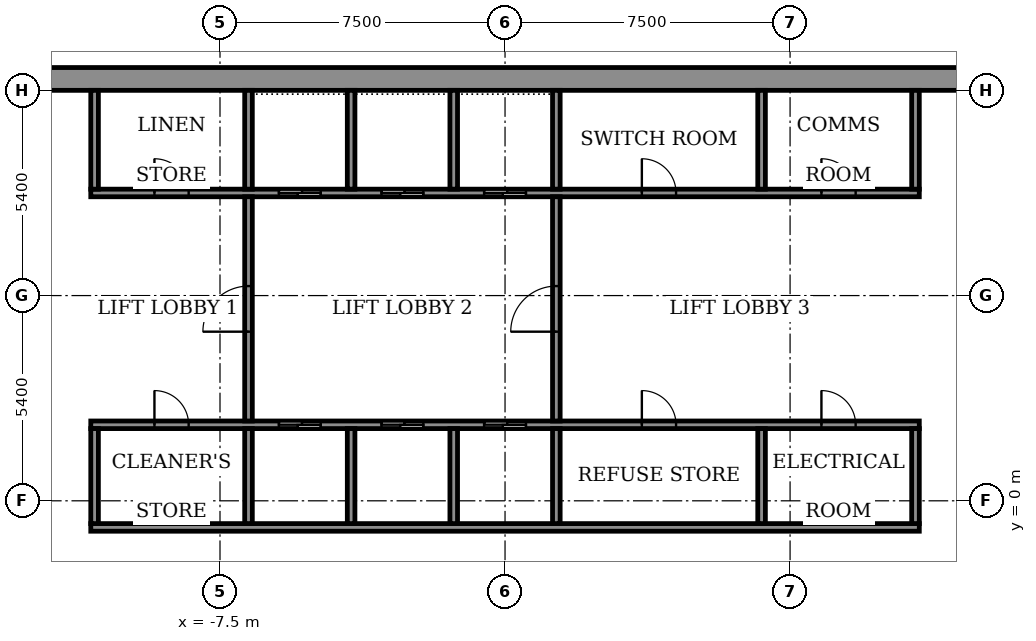
"""IFC4 building model, lengths in metres.
Left out: names, types, materials, properties, quantities, classifications, styles, units other than length and angle.
Written with IfcOpenShell. Run it as: python <this file> out.ifc"""

import sys

from ifc_helpers import new_model, si_unit, direction, frame, frame_2d, origin, place, context, subcontext, project, spatial, rectangle, extrude, element, fill, save


model = new_model("IFC4")
c1 = context("Model", 3, precision=1e-05, world=origin(), true_north=direction((0.0, 1.0)))
c2 = subcontext(c1, "Body", "Model", "MODEL_VIEW")
j1 = project(units=[si_unit("LENGTHUNIT", "METRE"), si_unit("PLANEANGLEUNIT", "RADIAN")], contexts=[c1])
p1 = place(None, origin())
s1 = spatial("IfcSite", under=j1, at=p1, CompositionType="ELEMENT")
p2 = place(p1, origin())
s2 = spatial("IfcBuilding", under=s1, at=p2, CompositionType="ELEMENT")
p3 = place(p2, frame((0.0, 0.0, 309.7)))
s3 = spatial("IfcBuildingStorey", under=s2, at=p3, CompositionType="ELEMENT", Elevation=309.7)
p4 = place(p3, frame((-14.4, 11.1, 0.0), z_axis=(0.0, 0.0, 1.0), x_axis=(1.0, 0.0, 0.0)))
e1 = element("IfcWall", 1, at=p4, inside=s3, PredefinedType="SHEAR", context=c2, shape_type="SweptSolid", body=[
    extrude(rectangle(XDim=28.8, YDim=0.6, at=frame_2d((14.4, 0.0))), origin(), (0.0, 0.0, 1.0), 3.6),
])
p5 = place(p3, frame((-10.9, -0.7, 0.0), z_axis=(0.0, 0.0, 1.0), x_axis=(1.0, 0.0, 0.0)))
e2 = element("IfcWall", 2, at=p5, inside=s3, PredefinedType="SHEAR", context=c2, shape_type="SweptSolid", body=[
    extrude(rectangle(XDim=21.8, YDim=0.2, at=frame_2d((10.9, 0.0))), origin(), (0.0, 0.0, 1.0), 3.05),
])
p6 = place(p3, frame((-10.9, 2.0, 0.0), z_axis=(0.0, 0.0, 1.0), x_axis=(1.0, 0.0, 0.0)))
e3 = element("IfcWall", 3, at=p6, inside=s3, PredefinedType="SHEAR", context=c2, shape_type="SweptSolid", body=[
    extrude(rectangle(XDim=21.8, YDim=0.2, at=frame_2d((10.9, 0.0))), origin(), (0.0, 0.0, 1.0), 3.05),
])
p7 = place(p6, frame((4.95, 0.0, 0.0)))
e4 = element("IfcOpeningElement", 4, at=p7, cuts=e3, PredefinedType="OPENING", context=c2, shape_type="SweptSolid", body=[
    extrude(rectangle(XDim=1.1, YDim=2.1, at=frame_2d((0.55, 1.05))), frame((0.0, 0.11, 0.0), z_axis=(0.0, -1.0, 0.0), x_axis=(1.0, 0.0, 0.0)), (0.0, 0.0, 1.0), 0.22),
])
p8 = place(p6, frame((7.65, 0.0, 0.0)))
e5 = element("IfcOpeningElement", 5, at=p8, cuts=e3, PredefinedType="OPENING", context=c2, shape_type="SweptSolid", body=[
    extrude(rectangle(XDim=1.1, YDim=2.1, at=frame_2d((0.55, 1.05))), frame((0.0, 0.11, 0.0), z_axis=(0.0, -1.0, 0.0), x_axis=(1.0, 0.0, 0.0)), (0.0, 0.0, 1.0), 0.22),
])
p9 = place(p6, frame((10.35, 0.0, 0.0)))
e6 = element("IfcOpeningElement", 6, at=p9, cuts=e3, PredefinedType="OPENING", context=c2, shape_type="SweptSolid", body=[
    extrude(rectangle(XDim=1.1, YDim=2.1, at=frame_2d((0.55, 1.05))), frame((0.0, 0.11, 0.0), z_axis=(0.0, -1.0, 0.0), x_axis=(1.0, 0.0, 0.0)), (0.0, 0.0, 1.0), 0.22),
])
p10 = place(p6, frame((1.675, 0.0, 0.0)))
e7 = element("IfcOpeningElement", 7, at=p10, cuts=e3, PredefinedType="OPENING", context=c2, shape_type="SweptSolid", body=[
    extrude(rectangle(XDim=0.9, YDim=2.1, at=frame_2d((0.45, 1.05))), frame((0.0, 0.11, 0.0), z_axis=(0.0, -1.0, 0.0), x_axis=(1.0, 0.0, 0.0)), (0.0, 0.0, 1.0), 0.22),
])
p11 = place(p6, frame((14.5, 0.0, 0.0)))
e8 = element("IfcOpeningElement", 8, at=p11, cuts=e3, PredefinedType="OPENING", context=c2, shape_type="SweptSolid", body=[
    extrude(rectangle(XDim=0.9, YDim=2.1, at=frame_2d((0.45, 1.05))), frame((0.0, 0.11, 0.0), z_axis=(0.0, -1.0, 0.0), x_axis=(1.0, 0.0, 0.0)), (0.0, 0.0, 1.0), 0.22),
])
p12 = place(p6, frame((19.225, 0.0, 0.0)))
e9 = element("IfcOpeningElement", 9, at=p12, cuts=e3, PredefinedType="OPENING", context=c2, shape_type="SweptSolid", body=[
    extrude(rectangle(XDim=0.9, YDim=2.1, at=frame_2d((0.45, 1.05))), frame((0.0, 0.11, 0.0), z_axis=(0.0, -1.0, 0.0), x_axis=(1.0, 0.0, 0.0)), (0.0, 0.0, 1.0), 0.22),
])
p13 = place(p3, frame((-10.9, 8.1, 0.0), z_axis=(0.0, 0.0, 1.0), x_axis=(1.0, 0.0, 0.0)))
e10 = element("IfcWall", 10, at=p13, inside=s3, PredefinedType="SHEAR", context=c2, shape_type="SweptSolid", body=[
    extrude(rectangle(XDim=21.8, YDim=0.2, at=frame_2d((10.9, 0.0))), origin(), (0.0, 0.0, 1.0), 3.05),
])
p14 = place(p13, frame((4.95, 0.0, 0.0)))
e11 = element("IfcOpeningElement", 11, at=p14, cuts=e10, PredefinedType="OPENING", context=c2, shape_type="SweptSolid", body=[
    extrude(rectangle(XDim=1.1, YDim=2.1, at=frame_2d((0.55, 1.05))), frame((0.0, 0.11, 0.0), z_axis=(0.0, -1.0, 0.0), x_axis=(1.0, 0.0, 0.0)), (0.0, 0.0, 1.0), 0.22),
])
p15 = place(p13, frame((7.65, 0.0, 0.0)))
e12 = element("IfcOpeningElement", 12, at=p15, cuts=e10, PredefinedType="OPENING", context=c2, shape_type="SweptSolid", body=[
    extrude(rectangle(XDim=1.1, YDim=2.1, at=frame_2d((0.55, 1.05))), frame((0.0, 0.11, 0.0), z_axis=(0.0, -1.0, 0.0), x_axis=(1.0, 0.0, 0.0)), (0.0, 0.0, 1.0), 0.22),
])
p16 = place(p13, frame((10.35, 0.0, 0.0)))
e13 = element("IfcOpeningElement", 13, at=p16, cuts=e10, PredefinedType="OPENING", context=c2, shape_type="SweptSolid", body=[
    extrude(rectangle(XDim=1.1, YDim=2.1, at=frame_2d((0.55, 1.05))), frame((0.0, 0.11, 0.0), z_axis=(0.0, -1.0, 0.0), x_axis=(1.0, 0.0, 0.0)), (0.0, 0.0, 1.0), 0.22),
])
p17 = place(p13, frame((1.675, 0.0, 0.0)))
e14 = element("IfcOpeningElement", 14, at=p17, cuts=e10, PredefinedType="OPENING", context=c2, shape_type="SweptSolid", body=[
    extrude(rectangle(XDim=0.9, YDim=2.1, at=frame_2d((0.45, 1.05))), frame((0.0, 0.11, 0.0), z_axis=(0.0, -1.0, 0.0), x_axis=(1.0, 0.0, 0.0)), (0.0, 0.0, 1.0), 0.22),
])
p18 = place(p13, frame((14.5, 0.0, 0.0)))
e15 = element("IfcOpeningElement", 15, at=p18, cuts=e10, PredefinedType="OPENING", context=c2, shape_type="SweptSolid", body=[
    extrude(rectangle(XDim=0.9, YDim=2.1, at=frame_2d((0.45, 1.05))), frame((0.0, 0.11, 0.0), z_axis=(0.0, -1.0, 0.0), x_axis=(1.0, 0.0, 0.0)), (0.0, 0.0, 1.0), 0.22),
])
p19 = place(p13, frame((19.225, 0.0, 0.0)))
e16 = element("IfcOpeningElement", 16, at=p19, cuts=e10, PredefinedType="OPENING", context=c2, shape_type="SweptSolid", body=[
    extrude(rectangle(XDim=0.9, YDim=2.1, at=frame_2d((0.45, 1.05))), frame((0.0, 0.11, 0.0), z_axis=(0.0, -1.0, 0.0), x_axis=(1.0, 0.0, 0.0)), (0.0, 0.0, 1.0), 0.22),
])
p20 = place(p3, frame((-10.8, -0.6, 0.0), z_axis=(0.0, 0.0, 1.0), x_axis=(0.0, 1.0, 0.0)))
e17 = element("IfcWall", 17, at=p20, inside=s3, PredefinedType="STANDARD", context=c2, shape_type="SweptSolid", body=[
    extrude(rectangle(XDim=2.5, YDim=0.2, at=frame_2d((1.25, 0.0))), origin(), (0.0, 0.0, 1.0), 3.05),
])
for number, where, z_axis, x_axis in (
    (18, (-6.75, -0.6, 0.0), (0.0, 0.0, 1.0), (0.0, 1.0, 0.0)),
    (19, (-4.05, -0.6, 0.0), (0.0, 0.0, 1.0), (0.0, 1.0, 0.0)),
    (20, (-1.35, -0.6, 0.0), (0.0, 0.0, 1.0), (0.0, 1.0, 0.0)),
    (21, (1.35, -0.6, 0.0), (0.0, 0.0, 1.0), (0.0, 1.0, 0.0)),
):
    element("IfcWall", number, at=place(p3, frame(where, z_axis=z_axis, x_axis=x_axis)), inside=s3, PredefinedType="SHEAR", context=c2, shape_type="SweptSolid", body=[
        extrude(rectangle(XDim=2.5, YDim=0.2, at=frame_2d((1.25, 0.0))), origin(), (0.0, 0.0, 1.0), 3.05),
    ])
for number, where, z_axis, x_axis in (
    (22, (6.75, -0.6, 0.0), (0.0, 0.0, 1.0), (0.0, 1.0, 0.0)),
    (23, (10.8, -0.6, 0.0), (0.0, 0.0, 1.0), (0.0, 1.0, 0.0)),
):
    element("IfcWall", number, at=place(p3, frame(where, z_axis=z_axis, x_axis=x_axis)), inside=s3, PredefinedType="STANDARD", context=c2, shape_type="SweptSolid", body=[
        extrude(rectangle(XDim=2.5, YDim=0.2, at=frame_2d((1.25, 0.0))), origin(), (0.0, 0.0, 1.0), 3.05),
    ])
p21 = place(p3, frame((-10.8, 8.2, 0.0), z_axis=(0.0, 0.0, 1.0), x_axis=(0.0, 1.0, 0.0)))
e24 = element("IfcWall", 24, at=p21, inside=s3, PredefinedType="STANDARD", context=c2, shape_type="SweptSolid", body=[
    extrude(rectangle(XDim=2.6, YDim=0.2, at=frame_2d((1.3, 0.0))), origin(), (0.0, 0.0, 1.0), 3.05),
])
for number, where, z_axis, x_axis in (
    (25, (-6.75, 8.2, 0.0), (0.0, 0.0, 1.0), (0.0, 1.0, 0.0)),
    (26, (-4.05, 8.2, 0.0), (0.0, 0.0, 1.0), (0.0, 1.0, 0.0)),
    (27, (-1.35, 8.2, 0.0), (0.0, 0.0, 1.0), (0.0, 1.0, 0.0)),
    (28, (1.35, 8.2, 0.0), (0.0, 0.0, 1.0), (0.0, 1.0, 0.0)),
):
    element("IfcWall", number, at=place(p3, frame(where, z_axis=z_axis, x_axis=x_axis)), inside=s3, PredefinedType="SHEAR", context=c2, shape_type="SweptSolid", body=[
        extrude(rectangle(XDim=2.6, YDim=0.2, at=frame_2d((1.3, 0.0))), origin(), (0.0, 0.0, 1.0), 3.05),
    ])
for number, where, z_axis, x_axis in (
    (29, (6.75, 8.2, 0.0), (0.0, 0.0, 1.0), (0.0, 1.0, 0.0)),
    (30, (10.8, 8.2, 0.0), (0.0, 0.0, 1.0), (0.0, 1.0, 0.0)),
):
    element("IfcWall", number, at=place(p3, frame(where, z_axis=z_axis, x_axis=x_axis)), inside=s3, PredefinedType="STANDARD", context=c2, shape_type="SweptSolid", body=[
        extrude(rectangle(XDim=2.6, YDim=0.2, at=frame_2d((1.3, 0.0))), origin(), (0.0, 0.0, 1.0), 3.05),
    ])
p22 = place(p3, frame((-6.75, 2.1, 0.0), z_axis=(0.0, 0.0, 1.0), x_axis=(0.0, 1.0, 0.0)))
e31 = element("IfcWall", 31, at=p22, inside=s3, PredefinedType="STANDARD", context=c2, shape_type="SweptSolid", body=[
    extrude(rectangle(XDim=5.9, YDim=0.2, at=frame_2d((2.95, 0.0))), origin(), (0.0, 0.0, 1.0), 3.05),
])
p23 = place(p22, frame((2.35, 0.0, 0.0)))
e32 = element("IfcOpeningElement", 32, at=p23, cuts=e31, PredefinedType="OPENING", context=c2, shape_type="SweptSolid", body=[
    extrude(rectangle(XDim=1.2, YDim=2.1, at=frame_2d((0.6, 1.05))), frame((0.0, 0.11, 0.0), z_axis=(0.0, -1.0, 0.0), x_axis=(1.0, 0.0, 0.0)), (0.0, 0.0, 1.0), 0.22),
])
p24 = place(p3, frame((1.35, 2.1, 0.0), z_axis=(0.0, 0.0, 1.0), x_axis=(0.0, 1.0, 0.0)))
e33 = element("IfcWall", 33, at=p24, inside=s3, PredefinedType="STANDARD", context=c2, shape_type="SweptSolid", body=[
    extrude(rectangle(XDim=5.9, YDim=0.2, at=frame_2d((2.95, 0.0))), origin(), (0.0, 0.0, 1.0), 3.05),
])
p25 = place(p24, frame((2.35, 0.0, 0.0)))
e34 = element("IfcOpeningElement", 34, at=p25, cuts=e33, PredefinedType="OPENING", context=c2, shape_type="SweptSolid", body=[
    extrude(rectangle(XDim=1.2, YDim=2.1, at=frame_2d((0.6, 1.05))), frame((0.0, 0.11, 0.0), z_axis=(0.0, -1.0, 0.0), x_axis=(1.0, 0.0, 0.0)), (0.0, 0.0, 1.0), 0.22),
])
p26 = place(p7, origin())
e35 = element("IfcDoor", 35, at=p26, inside=s3, OperationType="SLIDING_TO_LEFT", PredefinedType="DOOR", context=c2, shape_type="SweptSolid", body=[
    extrude(rectangle(XDim=1.1, YDim=2.1, at=frame_2d((0.55, 1.05))), frame((0.0, 0.025, 0.0), z_axis=(0.0, -1.0, 0.0), x_axis=(1.0, 0.0, 0.0)), (0.0, 0.0, 1.0), 0.05),
])
fill(e4, e35)
p27 = place(p8, origin())
e36 = element("IfcDoor", 36, at=p27, inside=s3, OperationType="SLIDING_TO_LEFT", PredefinedType="DOOR", context=c2, shape_type="SweptSolid", body=[
    extrude(rectangle(XDim=1.1, YDim=2.1, at=frame_2d((0.55, 1.05))), frame((0.0, 0.025, 0.0), z_axis=(0.0, -1.0, 0.0), x_axis=(1.0, 0.0, 0.0)), (0.0, 0.0, 1.0), 0.05),
])
fill(e5, e36)
p28 = place(p9, origin())
e37 = element("IfcDoor", 37, at=p28, inside=s3, OperationType="SLIDING_TO_LEFT", PredefinedType="DOOR", context=c2, shape_type="SweptSolid", body=[
    extrude(rectangle(XDim=1.1, YDim=2.1, at=frame_2d((0.55, 1.05))), frame((0.0, 0.025, 0.0), z_axis=(0.0, -1.0, 0.0), x_axis=(1.0, 0.0, 0.0)), (0.0, 0.0, 1.0), 0.05),
])
fill(e6, e37)
p29 = place(p14, origin())
e38 = element("IfcDoor", 38, at=p29, inside=s3, OperationType="SLIDING_TO_LEFT", PredefinedType="DOOR", context=c2, shape_type="SweptSolid", body=[
    extrude(rectangle(XDim=1.1, YDim=2.1, at=frame_2d((0.55, 1.05))), frame((0.0, 0.025, 0.0), z_axis=(0.0, -1.0, 0.0), x_axis=(1.0, 0.0, 0.0)), (0.0, 0.0, 1.0), 0.05),
])
fill(e11, e38)
p30 = place(p15, origin())
e39 = element("IfcDoor", 39, at=p30, inside=s3, OperationType="SLIDING_TO_LEFT", PredefinedType="DOOR", context=c2, shape_type="SweptSolid", body=[
    extrude(rectangle(XDim=1.1, YDim=2.1, at=frame_2d((0.55, 1.05))), frame((0.0, 0.025, 0.0), z_axis=(0.0, -1.0, 0.0), x_axis=(1.0, 0.0, 0.0)), (0.0, 0.0, 1.0), 0.05),
])
fill(e12, e39)
p31 = place(p16, origin())
e40 = element("IfcDoor", 40, at=p31, inside=s3, OperationType="SLIDING_TO_LEFT", PredefinedType="DOOR", context=c2, shape_type="SweptSolid", body=[
    extrude(rectangle(XDim=1.1, YDim=2.1, at=frame_2d((0.55, 1.05))), frame((0.0, 0.025, 0.0), z_axis=(0.0, -1.0, 0.0), x_axis=(1.0, 0.0, 0.0)), (0.0, 0.0, 1.0), 0.05),
])
fill(e13, e40)
p32 = place(p10, origin())
e41 = element("IfcDoor", 41, at=p32, inside=s3, OperationType="SINGLE_SWING_RIGHT", PredefinedType="DOOR", context=c2, shape_type="SweptSolid", body=[
    extrude(rectangle(XDim=0.9, YDim=2.1, at=frame_2d((0.45, 1.05))), frame((0.0, 0.025, 0.0), z_axis=(0.0, -1.0, 0.0), x_axis=(1.0, 0.0, 0.0)), (0.0, 0.0, 1.0), 0.05),
])
fill(e7, e41)
p33 = place(p11, origin())
e42 = element("IfcDoor", 42, at=p33, inside=s3, OperationType="SINGLE_SWING_RIGHT", PredefinedType="DOOR", context=c2, shape_type="SweptSolid", body=[
    extrude(rectangle(XDim=0.9, YDim=2.1, at=frame_2d((0.45, 1.05))), frame((0.0, 0.025, 0.0), z_axis=(0.0, -1.0, 0.0), x_axis=(1.0, 0.0, 0.0)), (0.0, 0.0, 1.0), 0.05),
])
fill(e8, e42)
p34 = place(p12, origin())
e43 = element("IfcDoor", 43, at=p34, inside=s3, OperationType="SINGLE_SWING_LEFT", PredefinedType="DOOR", context=c2, shape_type="SweptSolid", body=[
    extrude(rectangle(XDim=0.9, YDim=2.1, at=frame_2d((0.45, 1.05))), frame((0.0, 0.025, 0.0), z_axis=(0.0, -1.0, 0.0), x_axis=(1.0, 0.0, 0.0)), (0.0, 0.0, 1.0), 0.05),
])
fill(e9, e43)
p35 = place(p17, origin())
e44 = element("IfcDoor", 44, at=p35, inside=s3, OperationType="SINGLE_SWING_RIGHT", PredefinedType="DOOR", context=c2, shape_type="SweptSolid", body=[
    extrude(rectangle(XDim=0.9, YDim=2.1, at=frame_2d((0.45, 1.05))), frame((0.0, 0.025, 0.0), z_axis=(0.0, -1.0, 0.0), x_axis=(1.0, 0.0, 0.0)), (0.0, 0.0, 1.0), 0.05),
])
fill(e14, e44)
p36 = place(p18, origin())
e45 = element("IfcDoor", 45, at=p36, inside=s3, OperationType="SINGLE_SWING_LEFT", PredefinedType="DOOR", context=c2, shape_type="SweptSolid", body=[
    extrude(rectangle(XDim=0.9, YDim=2.1, at=frame_2d((0.45, 1.05))), frame((0.0, 0.025, 0.0), z_axis=(0.0, -1.0, 0.0), x_axis=(1.0, 0.0, 0.0)), (0.0, 0.0, 1.0), 0.05),
])
fill(e15, e45)
p37 = place(p19, origin())
e46 = element("IfcDoor", 46, at=p37, inside=s3, OperationType="SINGLE_SWING_LEFT", PredefinedType="DOOR", context=c2, shape_type="SweptSolid", body=[
    extrude(rectangle(XDim=0.9, YDim=2.1, at=frame_2d((0.45, 1.05))), frame((0.0, 0.025, 0.0), z_axis=(0.0, -1.0, 0.0), x_axis=(1.0, 0.0, 0.0)), (0.0, 0.0, 1.0), 0.05),
])
fill(e16, e46)
p38 = place(p23, origin())
e47 = element("IfcDoor", 47, at=p38, inside=s3, OperationType="SINGLE_SWING_LEFT", PredefinedType="DOOR", context=c2, shape_type="SweptSolid", body=[
    extrude(rectangle(XDim=1.2, YDim=2.1, at=frame_2d((0.6, 1.05))), frame((0.0, 0.025, 0.0), z_axis=(0.0, -1.0, 0.0), x_axis=(1.0, 0.0, 0.0)), (0.0, 0.0, 1.0), 0.05),
])
fill(e32, e47)
p39 = place(p25, origin())
e48 = element("IfcDoor", 48, at=p39, inside=s3, OperationType="SINGLE_SWING_LEFT", PredefinedType="DOOR", context=c2, shape_type="SweptSolid", body=[
    extrude(rectangle(XDim=1.2, YDim=2.1, at=frame_2d((0.6, 1.05))), frame((0.0, 0.025, 0.0), z_axis=(0.0, -1.0, 0.0), x_axis=(1.0, 0.0, 0.0)), (0.0, 0.0, 1.0), 0.05),
])
fill(e34, e48)
save(model, sys.argv[1])
